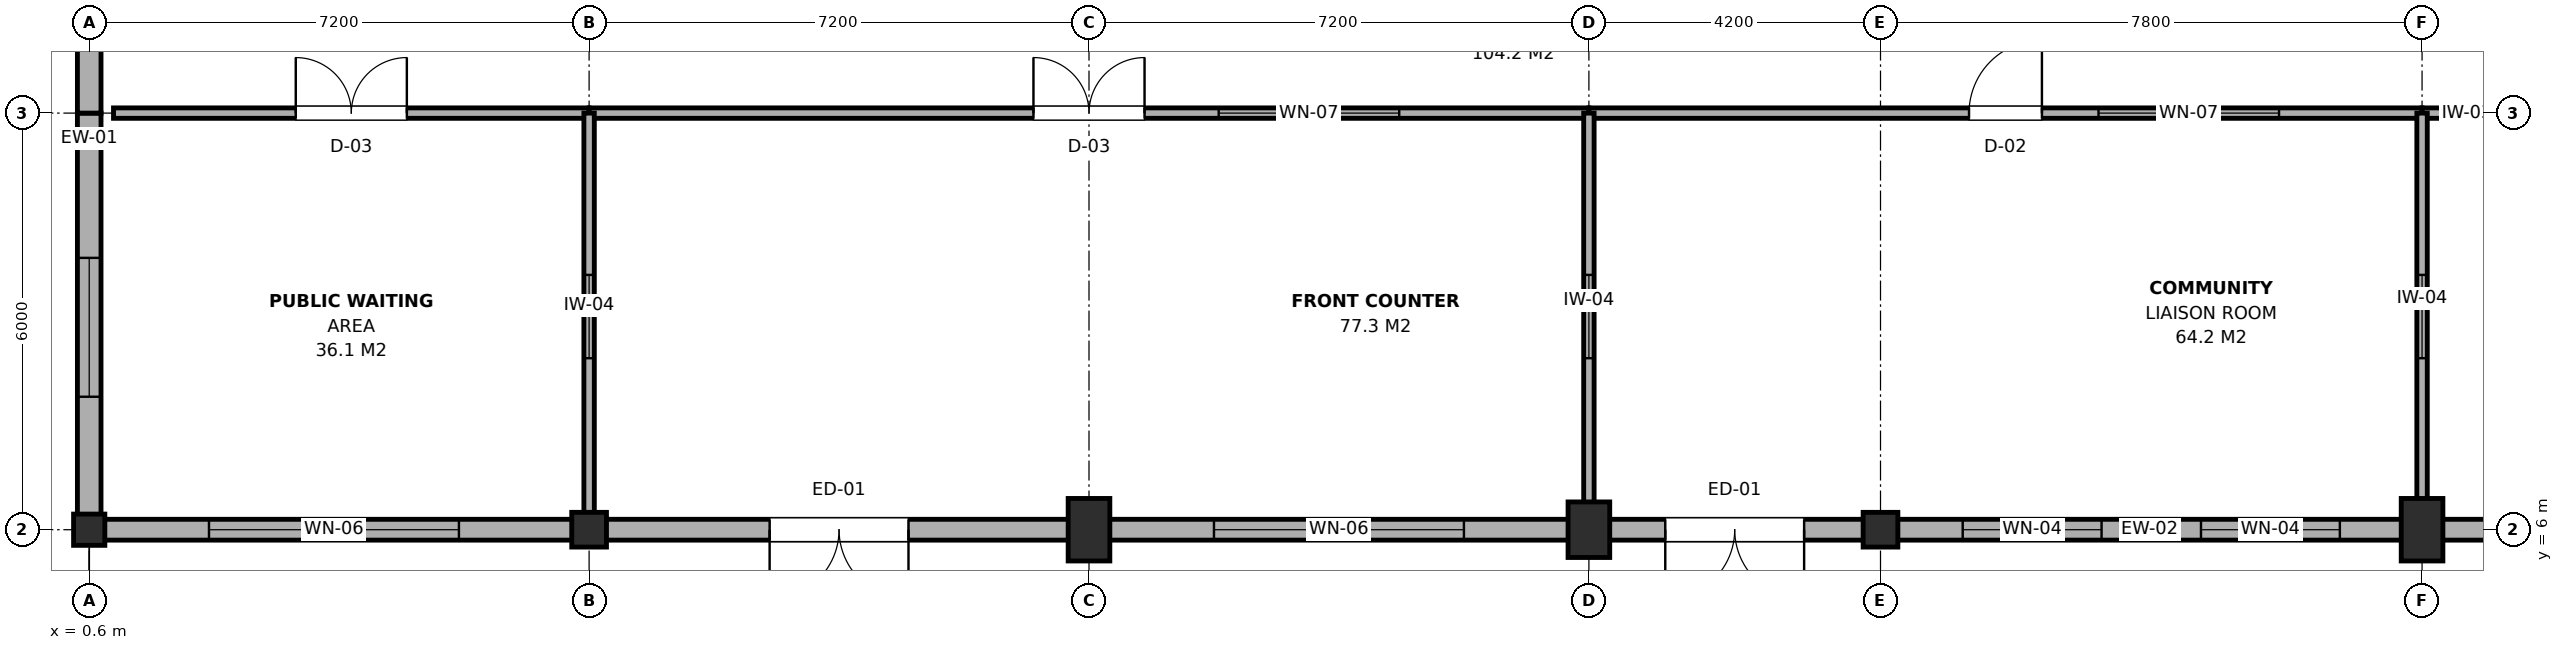
"""IFC4 building model, lengths in metres.
Left out: names, types, materials, properties, quantities, classifications, styles, units other than length and angle.
Written with IfcOpenShell. Run it as: python <this file> out.ifc"""

import sys

from ifc_helpers import new_model, si_unit, direction, frame, frame_2d, origin, origin_2d, place, context, subcontext, project, spatial, rectangle, extrude, element, fill, save


model = new_model("IFC4")
c1 = context("Model", 3, precision=1e-05, world=origin(), true_north=direction((0.0, 1.0)))
c2 = subcontext(c1, "Body", "Model", "MODEL_VIEW")
j1 = project(units=[si_unit("LENGTHUNIT", "METRE"), si_unit("PLANEANGLEUNIT", "RADIAN")], contexts=[c1])
p1 = place(None, origin())
s1 = spatial("IfcSite", under=j1, at=p1, CompositionType="ELEMENT")
p2 = place(p1, origin())
s2 = spatial("IfcBuilding", under=s1, at=p2, CompositionType="ELEMENT")
p3 = place(p2, origin())
s3 = spatial("IfcBuildingStorey", under=s2, at=p3, CompositionType="ELEMENT", Elevation=0.0)
p4 = place(p3, frame((0.6, 6.0, 0.0), z_axis=(0.0, 0.0, 1.0), x_axis=(1.0, 0.0, 0.0)))
e1 = element("IfcColumn", 1, at=p4, inside=s3, PredefinedType="COLUMN", context=c2, shape_type="SweptSolid", body=[
    extrude(rectangle(XDim=0.45, YDim=0.45, at=origin_2d()), origin(), (0.0, 0.0, 1.0), 4.8),
])
p5 = place(p3, frame((7.8, 6.0, 0.0), z_axis=(0.0, 0.0, 1.0), x_axis=(1.0, 0.0, 0.0)))
e2 = element("IfcColumn", 2, at=p5, inside=s3, PredefinedType="COLUMN", context=c2, shape_type="SweptSolid", body=[
    extrude(rectangle(XDim=0.5, YDim=0.5, at=origin_2d()), origin(), (0.0, 0.0, 1.0), 4.8),
])
p6 = place(p3, frame((15.0, 6.0, 0.0), z_axis=(0.0, 0.0, 1.0), x_axis=(1.0, 0.0, 0.0)))
e3 = element("IfcColumn", 3, at=p6, inside=s3, PredefinedType="COLUMN", context=c2, shape_type="SweptSolid", body=[
    extrude(rectangle(XDim=0.6, YDim=0.9, at=origin_2d()), origin(), (0.0, 0.0, 1.0), 4.8),
])
p7 = place(p3, frame((22.2, 6.0, 0.0), z_axis=(0.0, 0.0, 1.0), x_axis=(1.0, 0.0, 0.0)))
e4 = element("IfcColumn", 4, at=p7, inside=s3, PredefinedType="COLUMN", context=c2, shape_type="SweptSolid", body=[
    extrude(rectangle(XDim=0.6, YDim=0.8, at=origin_2d()), origin(), (0.0, 0.0, 1.0), 4.8),
])
p8 = place(p3, frame((26.4, 6.0, 0.0), z_axis=(0.0, 0.0, 1.0), x_axis=(1.0, 0.0, 0.0)))
e5 = element("IfcColumn", 5, at=p8, inside=s3, PredefinedType="COLUMN", context=c2, shape_type="SweptSolid", body=[
    extrude(rectangle(XDim=0.5, YDim=0.5, at=origin_2d()), origin(), (0.0, 0.0, 1.0), 4.8),
])
p9 = place(p3, frame((34.2, 6.0, 0.0), z_axis=(0.0, 0.0, 1.0), x_axis=(1.0, 0.0, 0.0)))
e6 = element("IfcColumn", 6, at=p9, inside=s3, PredefinedType="COLUMN", context=c2, shape_type="SweptSolid", body=[
    extrude(rectangle(XDim=0.6, YDim=0.9, at=origin_2d()), origin(), (0.0, 0.0, 1.0), 4.8),
])
p10 = place(p3, frame((0.45, 6.0, 0.0), z_axis=(0.0, 0.0, 1.0), x_axis=(1.0, 0.0, 0.0)))
e7 = element("IfcWall", 7, at=p10, inside=s3, PredefinedType="SOLIDWALL", context=c2, shape_type="SweptSolid", body=[
    extrude(rectangle(XDim=7.35, YDim=0.3, at=frame_2d((3.675, 0.0))), origin(), (0.0, 0.0, 1.0), 4.205),
])
p11 = place(p10, frame((1.875, 0.0, 0.8)))
e8 = element("IfcOpeningElement", 8, at=p11, cuts=e7, PredefinedType="OPENING", context=c2, shape_type="SweptSolid", body=[
    extrude(rectangle(XDim=3.6, YDim=2.4, at=frame_2d((1.8, 1.2))), frame((0.0, 0.165, 0.0), z_axis=(0.0, -1.0, 0.0), x_axis=(1.0, 0.0, 0.0)), (0.0, 0.0, 1.0), 0.33),
])
p12 = place(p3, frame((7.8, 6.0, 0.0), z_axis=(0.0, 0.0, 1.0), x_axis=(1.0, 0.0, 0.0)))
e9 = element("IfcWall", 9, at=p12, inside=s3, PredefinedType="SOLIDWALL", context=c2, shape_type="SweptSolid", body=[
    extrude(rectangle(XDim=7.2, YDim=0.3, at=frame_2d((3.6, 0.0))), origin(), (0.0, 0.0, 1.0), 4.205),
])
p13 = place(p12, frame((2.6, 0.0, 0.0)))
e10 = element("IfcOpeningElement", 10, at=p13, cuts=e9, PredefinedType="OPENING", context=c2, shape_type="SweptSolid", body=[
    extrude(rectangle(XDim=2.0, YDim=2.25, at=frame_2d((1.0, 1.125))), frame((0.0, 0.165, 0.0), z_axis=(0.0, -1.0, 0.0), x_axis=(1.0, 0.0, 0.0)), (0.0, 0.0, 1.0), 0.33),
])
p14 = place(p3, frame((15.0, 6.0, 0.0), z_axis=(0.0, 0.0, 1.0), x_axis=(1.0, 0.0, 0.0)))
e11 = element("IfcWall", 11, at=p14, inside=s3, PredefinedType="SOLIDWALL", context=c2, shape_type="SweptSolid", body=[
    extrude(rectangle(XDim=7.2, YDim=0.3, at=frame_2d((3.6, 0.0))), origin(), (0.0, 0.0, 1.0), 3.955),
])
p15 = place(p14, frame((1.8, 0.0, 0.8)))
e12 = element("IfcOpeningElement", 12, at=p15, cuts=e11, PredefinedType="OPENING", context=c2, shape_type="SweptSolid", body=[
    extrude(rectangle(XDim=3.6, YDim=2.4, at=frame_2d((1.8, 1.2))), frame((0.0, 0.165, 0.0), z_axis=(0.0, -1.0, 0.0), x_axis=(1.0, 0.0, 0.0)), (0.0, 0.0, 1.0), 0.33),
])
p16 = place(p3, frame((22.2, 6.0, 0.0), z_axis=(0.0, 0.0, 1.0), x_axis=(1.0, 0.0, 0.0)))
e13 = element("IfcWall", 13, at=p16, inside=s3, PredefinedType="SOLIDWALL", context=c2, shape_type="SweptSolid", body=[
    extrude(rectangle(XDim=4.2, YDim=0.3, at=frame_2d((2.1, 0.0))), origin(), (0.0, 0.0, 1.0), 4.005),
])
p17 = place(p16, frame((1.1, 0.0, 0.0)))
e14 = element("IfcOpeningElement", 14, at=p17, cuts=e13, PredefinedType="OPENING", context=c2, shape_type="SweptSolid", body=[
    extrude(rectangle(XDim=2.0, YDim=2.25, at=frame_2d((1.0, 1.125))), frame((0.0, 0.165, 0.0), z_axis=(0.0, -1.0, 0.0), x_axis=(1.0, 0.0, 0.0)), (0.0, 0.0, 1.0), 0.33),
])
p18 = place(p3, frame((26.4, 6.0, 0.0), z_axis=(0.0, 0.0, 1.0), x_axis=(1.0, 0.0, 0.0)))
e15 = element("IfcWall", 15, at=p18, inside=s3, PredefinedType="SOLIDWALL", context=c2, shape_type="SweptSolid", body=[
    extrude(rectangle(XDim=7.8, YDim=0.3, at=frame_2d((3.9, 0.0))), origin(), (0.0, 0.0, 1.0), 4.005),
])
p19 = place(p18, frame((1.184, 0.0, 0.8)))
e16 = element("IfcOpeningElement", 16, at=p19, cuts=e15, PredefinedType="OPENING", context=c2, shape_type="SweptSolid", body=[
    extrude(rectangle(XDim=2.0, YDim=1.8, at=frame_2d((1.0, 0.9))), frame((0.0, 0.165, 0.0), z_axis=(0.0, -1.0, 0.0), x_axis=(1.0, 0.0, 0.0)), (0.0, 0.0, 1.0), 0.33),
])
p20 = place(p18, frame((4.616, 0.0, 0.8)))
e17 = element("IfcOpeningElement", 17, at=p20, cuts=e15, PredefinedType="OPENING", context=c2, shape_type="SweptSolid", body=[
    extrude(rectangle(XDim=2.0, YDim=1.8, at=frame_2d((1.0, 0.9))), frame((0.0, 0.165, 0.0), z_axis=(0.0, -1.0, 0.0), x_axis=(1.0, 0.0, 0.0)), (0.0, 0.0, 1.0), 0.33),
])
p21 = place(p3, frame((34.2, 6.0, 0.0), z_axis=(0.0, 0.0, 1.0), x_axis=(1.0, 0.0, 0.0)))
e18 = element("IfcWall", 18, at=p21, inside=s3, PredefinedType="SOLIDWALL", context=c2, shape_type="SweptSolid", body=[
    extrude(rectangle(XDim=6.0, YDim=0.3, at=frame_2d((3.0, 0.0))), origin(), (0.0, 0.0, 1.0), 4.105),
])
p22 = place(p21, frame((1.2, 0.0, 0.8)))
e19 = element("IfcOpeningElement", 19, at=p22, cuts=e18, PredefinedType="OPENING", context=c2, shape_type="SweptSolid", body=[
    extrude(rectangle(XDim=3.6, YDim=2.4, at=frame_2d((1.8, 1.2))), frame((0.0, 0.165, 0.0), z_axis=(0.0, -1.0, 0.0), x_axis=(1.0, 0.0, 0.0)), (0.0, 0.0, 1.0), 0.33),
])
p23 = place(p3, frame((0.6, 5.83, 0.0), z_axis=(0.0, 0.0, 1.0), x_axis=(0.0, 1.0, 0.0)))
e20 = element("IfcWall", 20, at=p23, inside=s3, PredefinedType="SOLIDWALL", context=c2, shape_type="SweptSolid", body=[
    extrude(rectangle(XDim=6.17, YDim=0.34, at=frame_2d((3.085, 0.0))), origin(), (0.0, 0.0, 1.0), 4.055),
])
p24 = place(p23, frame((2.085, 0.0, 0.9)))
e21 = element("IfcOpeningElement", 21, at=p24, cuts=e20, PredefinedType="OPENING", context=c2, shape_type="SweptSolid", body=[
    extrude(rectangle(XDim=2.0, YDim=1.8, at=frame_2d((1.0, 0.9))), frame((0.0, 0.185, 0.0), z_axis=(0.0, -1.0, 0.0), x_axis=(1.0, 0.0, 0.0)), (0.0, 0.0, 1.0), 0.37),
])
p25 = place(p3, frame((0.6, 12.0, 0.0), z_axis=(0.0, 0.0, 1.0), x_axis=(0.0, 1.0, 0.0)))
e22 = element("IfcWall", 22, at=p25, inside=s3, PredefinedType="SOLIDWALL", context=c2, shape_type="SweptSolid", body=[
    extrude(rectangle(XDim=5.57, YDim=0.34, at=frame_2d((2.785, 0.0))), origin(), (0.0, 0.0, 1.0), 3.955),
])
p26 = place(p3, frame((0.95, 12.0, 0.0), z_axis=(0.0, 0.0, 1.0), x_axis=(1.0, 0.0, 0.0)))
e23 = element("IfcWall", 23, at=p26, inside=s3, PredefinedType="PARTITIONING", context=c2, shape_type="SweptSolid", body=[
    extrude(rectangle(XDim=6.85, YDim=0.15, at=frame_2d((3.425, 0.0))), origin(), (0.0, 0.0, 1.0), 4.055),
])
p27 = place(p26, frame((2.625, 0.0, 0.0)))
e24 = element("IfcOpeningElement", 24, at=p27, cuts=e23, PredefinedType="OPENING", context=c2, shape_type="SweptSolid", body=[
    extrude(rectangle(XDim=1.6, YDim=2.15, at=frame_2d((0.8, 1.075))), frame((0.0, 0.09, 0.0), z_axis=(0.0, -1.0, 0.0), x_axis=(1.0, 0.0, 0.0)), (0.0, 0.0, 1.0), 0.18),
])
p28 = place(p3, frame((7.8, 12.0, 0.0), z_axis=(0.0, 0.0, 1.0), x_axis=(1.0, 0.0, 0.0)))
e25 = element("IfcWall", 25, at=p28, inside=s3, PredefinedType="PARTITIONING", context=c2, shape_type="SweptSolid", body=[
    extrude(rectangle(XDim=14.4, YDim=0.15, at=frame_2d((7.2, 0.0))), origin(), (0.0, 0.0, 1.0), 4.055),
])
p29 = place(p28, frame((6.4, 0.0, 0.0)))
e26 = element("IfcOpeningElement", 26, at=p29, cuts=e25, PredefinedType="OPENING", context=c2, shape_type="SweptSolid", body=[
    extrude(rectangle(XDim=1.6, YDim=2.15, at=frame_2d((0.8, 1.075))), frame((0.0, 0.09, 0.0), z_axis=(0.0, -1.0, 0.0), x_axis=(1.0, 0.0, 0.0)), (0.0, 0.0, 1.0), 0.18),
])
p30 = place(p28, frame((9.068, 0.0, 0.95)))
e27 = element("IfcOpeningElement", 27, at=p30, cuts=e25, PredefinedType="OPENING", context=c2, shape_type="SweptSolid", body=[
    extrude(rectangle(XDim=2.6, YDim=1.5, at=frame_2d((1.3, 0.75))), frame((0.0, 0.09, 0.0), z_axis=(0.0, -1.0, 0.0), x_axis=(1.0, 0.0, 0.0)), (0.0, 0.0, 1.0), 0.18),
])
p31 = place(p3, frame((7.8, 6.14, 0.0), z_axis=(0.0, 0.0, 1.0), x_axis=(0.0, 1.0, 0.0)))
e28 = element("IfcWall", 28, at=p31, inside=s3, PredefinedType="PARTITIONING", context=c2, shape_type="SweptSolid", body=[
    extrude(rectangle(XDim=5.86, YDim=0.15, at=frame_2d((2.93, 0.0))), origin(), (0.0, 0.0, 1.0), 4.055),
])
p32 = place(p31, frame((2.33, 0.0, 0.95)))
e29 = element("IfcOpeningElement", 29, at=p32, cuts=e28, PredefinedType="OPENING", context=c2, shape_type="SweptSolid", body=[
    extrude(rectangle(XDim=1.2, YDim=1.5, at=frame_2d((0.6, 0.75))), frame((0.0, 0.09, 0.0), z_axis=(0.0, -1.0, 0.0), x_axis=(1.0, 0.0, 0.0)), (0.0, 0.0, 1.0), 0.18),
])
p33 = place(p3, frame((22.2, 12.0, 0.0), z_axis=(0.0, 0.0, 1.0), x_axis=(1.0, 0.0, 0.0)))
e30 = element("IfcWall", 30, at=p33, inside=s3, PredefinedType="PARTITIONING", context=c2, shape_type="SweptSolid", body=[
    extrude(rectangle(XDim=12.0, YDim=0.15, at=frame_2d((6.0, 0.0))), origin(), (0.0, 0.0, 1.0), 3.965),
])
p34 = place(p33, frame((5.475, 0.0, 0.0)))
e31 = element("IfcOpeningElement", 31, at=p34, cuts=e30, PredefinedType="OPENING", context=c2, shape_type="SweptSolid", body=[
    extrude(rectangle(XDim=1.05, YDim=2.15, at=frame_2d((0.525, 1.075))), frame((0.0, 0.09, 0.0), z_axis=(0.0, -1.0, 0.0), x_axis=(1.0, 0.0, 0.0)), (0.0, 0.0, 1.0), 0.18),
])
p35 = place(p33, frame((7.34, 0.0, 0.95)))
e32 = element("IfcOpeningElement", 32, at=p35, cuts=e30, PredefinedType="OPENING", context=c2, shape_type="SweptSolid", body=[
    extrude(rectangle(XDim=2.6, YDim=1.5, at=frame_2d((1.3, 0.75))), frame((0.0, 0.09, 0.0), z_axis=(0.0, -1.0, 0.0), x_axis=(1.0, 0.0, 0.0)), (0.0, 0.0, 1.0), 0.18),
])
p36 = place(p3, frame((22.2, 6.14, 0.0), z_axis=(0.0, 0.0, 1.0), x_axis=(0.0, 1.0, 0.0)))
e33 = element("IfcWall", 33, at=p36, inside=s3, PredefinedType="PARTITIONING", context=c2, shape_type="SweptSolid", body=[
    extrude(rectangle(XDim=5.86, YDim=0.15, at=frame_2d((2.93, 0.0))), origin(), (0.0, 0.0, 1.0), 4.055),
])
p37 = place(p36, frame((2.33, 0.0, 0.95)))
e34 = element("IfcOpeningElement", 34, at=p37, cuts=e33, PredefinedType="OPENING", context=c2, shape_type="SweptSolid", body=[
    extrude(rectangle(XDim=1.2, YDim=1.5, at=frame_2d((0.6, 0.75))), frame((0.0, 0.09, 0.0), z_axis=(0.0, -1.0, 0.0), x_axis=(1.0, 0.0, 0.0)), (0.0, 0.0, 1.0), 0.18),
])
p38 = place(p3, frame((34.2, 12.0, 0.0), z_axis=(0.0, 0.0, 1.0), x_axis=(1.0, 0.0, 0.0)))
e35 = element("IfcWall", 35, at=p38, inside=s3, PredefinedType="PARTITIONING", context=c2, shape_type="SweptSolid", body=[
    extrude(rectangle(XDim=15.2, YDim=0.15, at=frame_2d((7.6, 0.0))), origin(), (0.0, 0.0, 1.0), 3.865),
])
p39 = place(p38, frame((6.8, 0.0, 0.0)))
e36 = element("IfcOpeningElement", 36, at=p39, cuts=e35, PredefinedType="OPENING", context=c2, shape_type="SweptSolid", body=[
    extrude(rectangle(XDim=1.6, YDim=2.15, at=frame_2d((0.8, 1.075))), frame((0.0, 0.09, 0.0), z_axis=(0.0, -1.0, 0.0), x_axis=(1.0, 0.0, 0.0)), (0.0, 0.0, 1.0), 0.18),
])
p40 = place(p38, frame((9.644, 0.0, 0.95)))
e37 = element("IfcOpeningElement", 37, at=p40, cuts=e35, PredefinedType="OPENING", context=c2, shape_type="SweptSolid", body=[
    extrude(rectangle(XDim=2.6, YDim=1.5, at=frame_2d((1.3, 0.75))), frame((0.0, 0.09, 0.0), z_axis=(0.0, -1.0, 0.0), x_axis=(1.0, 0.0, 0.0)), (0.0, 0.0, 1.0), 0.18),
])
p41 = place(p3, frame((34.2, 6.14, 0.0), z_axis=(0.0, 0.0, 1.0), x_axis=(0.0, 1.0, 0.0)))
e38 = element("IfcWall", 38, at=p41, inside=s3, PredefinedType="PARTITIONING", context=c2, shape_type="SweptSolid", body=[
    extrude(rectangle(XDim=5.86, YDim=0.15, at=frame_2d((2.93, 0.0))), origin(), (0.0, 0.0, 1.0), 3.965),
])
p42 = place(p41, frame((2.33, 0.0, 0.95)))
e39 = element("IfcOpeningElement", 39, at=p42, cuts=e38, PredefinedType="OPENING", context=c2, shape_type="SweptSolid", body=[
    extrude(rectangle(XDim=1.2, YDim=1.5, at=frame_2d((0.6, 0.75))), frame((0.0, 0.09, 0.0), z_axis=(0.0, -1.0, 0.0), x_axis=(1.0, 0.0, 0.0)), (0.0, 0.0, 1.0), 0.18),
])
p43 = place(p11, origin())
e40 = element("IfcWindow", 40, at=p43, inside=s3, PartitioningType="SINGLE_PANEL", PredefinedType="WINDOW", context=c2, shape_type="SweptSolid", body=[
    extrude(rectangle(XDim=3.6, YDim=2.4, at=frame_2d((1.8, 1.2))), frame((0.0, 0.03, 0.0), z_axis=(0.0, -1.0, 0.0), x_axis=(1.0, 0.0, 0.0)), (0.0, 0.0, 1.0), 0.06),
])
fill(e8, e40)
p44 = place(p13, frame((2.0, 0.0, 0.0), z_axis=(0.0, 0.0, 1.0), x_axis=(-1.0, 0.0, 0.0)))
e41 = element("IfcDoor", 41, at=p44, inside=s3, OperationType="DOUBLE_DOOR_SINGLE_SWING", PredefinedType="DOOR", context=c2, shape_type="SweptSolid", body=[
    extrude(rectangle(XDim=2.0, YDim=2.25, at=frame_2d((1.0, 1.125))), frame((0.0, 0.025, 0.0), z_axis=(0.0, -1.0, 0.0), x_axis=(1.0, 0.0, 0.0)), (0.0, 0.0, 1.0), 0.05),
])
fill(e10, e41)
p45 = place(p15, origin())
e42 = element("IfcWindow", 42, at=p45, inside=s3, PartitioningType="SINGLE_PANEL", PredefinedType="WINDOW", context=c2, shape_type="SweptSolid", body=[
    extrude(rectangle(XDim=3.6, YDim=2.4, at=frame_2d((1.8, 1.2))), frame((0.0, 0.03, 0.0), z_axis=(0.0, -1.0, 0.0), x_axis=(1.0, 0.0, 0.0)), (0.0, 0.0, 1.0), 0.06),
])
fill(e12, e42)
p46 = place(p17, frame((2.0, 0.0, 0.0), z_axis=(0.0, 0.0, 1.0), x_axis=(-1.0, 0.0, 0.0)))
e43 = element("IfcDoor", 43, at=p46, inside=s3, OperationType="DOUBLE_DOOR_SINGLE_SWING", PredefinedType="DOOR", context=c2, shape_type="SweptSolid", body=[
    extrude(rectangle(XDim=2.0, YDim=2.25, at=frame_2d((1.0, 1.125))), frame((0.0, 0.025, 0.0), z_axis=(0.0, -1.0, 0.0), x_axis=(1.0, 0.0, 0.0)), (0.0, 0.0, 1.0), 0.05),
])
fill(e14, e43)
p47 = place(p19, origin())
e44 = element("IfcWindow", 44, at=p47, inside=s3, PartitioningType="SINGLE_PANEL", PredefinedType="WINDOW", context=c2, shape_type="SweptSolid", body=[
    extrude(rectangle(XDim=2.0, YDim=1.8, at=frame_2d((1.0, 0.9))), frame((0.0, 0.03, 0.0), z_axis=(0.0, -1.0, 0.0), x_axis=(1.0, 0.0, 0.0)), (0.0, 0.0, 1.0), 0.06),
])
fill(e16, e44)
p48 = place(p20, origin())
e45 = element("IfcWindow", 45, at=p48, inside=s3, PartitioningType="SINGLE_PANEL", PredefinedType="WINDOW", context=c2, shape_type="SweptSolid", body=[
    extrude(rectangle(XDim=2.0, YDim=1.8, at=frame_2d((1.0, 0.9))), frame((0.0, 0.03, 0.0), z_axis=(0.0, -1.0, 0.0), x_axis=(1.0, 0.0, 0.0)), (0.0, 0.0, 1.0), 0.06),
])
fill(e17, e45)
p49 = place(p24, origin())
e46 = element("IfcWindow", 46, at=p49, inside=s3, PartitioningType="SINGLE_PANEL", PredefinedType="WINDOW", context=c2, shape_type="SweptSolid", body=[
    extrude(rectangle(XDim=2.0, YDim=1.8, at=frame_2d((1.0, 0.9))), frame((0.0, 0.03, 0.0), z_axis=(0.0, -1.0, 0.0), x_axis=(1.0, 0.0, 0.0)), (0.0, 0.0, 1.0), 0.06),
])
fill(e21, e46)
p50 = place(p27, origin())
e47 = element("IfcDoor", 47, at=p50, inside=s3, OperationType="DOUBLE_DOOR_SINGLE_SWING", PredefinedType="DOOR", context=c2, shape_type="SweptSolid", body=[
    extrude(rectangle(XDim=1.6, YDim=2.15, at=frame_2d((0.8, 1.075))), frame((0.0, 0.025, 0.0), z_axis=(0.0, -1.0, 0.0), x_axis=(1.0, 0.0, 0.0)), (0.0, 0.0, 1.0), 0.05),
])
fill(e24, e47)
p51 = place(p29, origin())
e48 = element("IfcDoor", 48, at=p51, inside=s3, OperationType="DOUBLE_DOOR_SINGLE_SWING", PredefinedType="DOOR", context=c2, shape_type="SweptSolid", body=[
    extrude(rectangle(XDim=1.6, YDim=2.15, at=frame_2d((0.8, 1.075))), frame((0.0, 0.025, 0.0), z_axis=(0.0, -1.0, 0.0), x_axis=(1.0, 0.0, 0.0)), (0.0, 0.0, 1.0), 0.05),
])
fill(e26, e48)
p52 = place(p30, origin())
e49 = element("IfcWindow", 49, at=p52, inside=s3, PartitioningType="SINGLE_PANEL", PredefinedType="WINDOW", context=c2, shape_type="SweptSolid", body=[
    extrude(rectangle(XDim=2.6, YDim=1.5, at=frame_2d((1.3, 0.75))), frame((0.0, 0.03, 0.0), z_axis=(0.0, -1.0, 0.0), x_axis=(1.0, 0.0, 0.0)), (0.0, 0.0, 1.0), 0.06),
])
fill(e27, e49)
p53 = place(p32, origin())
e50 = element("IfcWindow", 50, at=p53, inside=s3, PartitioningType="SINGLE_PANEL", PredefinedType="WINDOW", context=c2, shape_type="SweptSolid", body=[
    extrude(rectangle(XDim=1.2, YDim=1.5, at=frame_2d((0.6, 0.75))), frame((0.0, 0.03, 0.0), z_axis=(0.0, -1.0, 0.0), x_axis=(1.0, 0.0, 0.0)), (0.0, 0.0, 1.0), 0.06),
])
fill(e29, e50)
p54 = place(p34, origin())
e51 = element("IfcDoor", 51, at=p54, inside=s3, OperationType="SINGLE_SWING_RIGHT", PredefinedType="DOOR", context=c2, shape_type="SweptSolid", body=[
    extrude(rectangle(XDim=1.05, YDim=2.15, at=frame_2d((0.525, 1.075))), frame((0.0, 0.025, 0.0), z_axis=(0.0, -1.0, 0.0), x_axis=(1.0, 0.0, 0.0)), (0.0, 0.0, 1.0), 0.05),
])
fill(e31, e51)
p55 = place(p35, origin())
e52 = element("IfcWindow", 52, at=p55, inside=s3, PartitioningType="SINGLE_PANEL", PredefinedType="WINDOW", context=c2, shape_type="SweptSolid", body=[
    extrude(rectangle(XDim=2.6, YDim=1.5, at=frame_2d((1.3, 0.75))), frame((0.0, 0.03, 0.0), z_axis=(0.0, -1.0, 0.0), x_axis=(1.0, 0.0, 0.0)), (0.0, 0.0, 1.0), 0.06),
])
fill(e32, e52)
p56 = place(p37, origin())
e53 = element("IfcWindow", 53, at=p56, inside=s3, PartitioningType="SINGLE_PANEL", PredefinedType="WINDOW", context=c2, shape_type="SweptSolid", body=[
    extrude(rectangle(XDim=1.2, YDim=1.5, at=frame_2d((0.6, 0.75))), frame((0.0, 0.03, 0.0), z_axis=(0.0, -1.0, 0.0), x_axis=(1.0, 0.0, 0.0)), (0.0, 0.0, 1.0), 0.06),
])
fill(e34, e53)
p57 = place(p42, origin())
e54 = element("IfcWindow", 54, at=p57, inside=s3, PartitioningType="SINGLE_PANEL", PredefinedType="WINDOW", context=c2, shape_type="SweptSolid", body=[
    extrude(rectangle(XDim=1.2, YDim=1.5, at=frame_2d((0.6, 0.75))), frame((0.0, 0.03, 0.0), z_axis=(0.0, -1.0, 0.0), x_axis=(1.0, 0.0, 0.0)), (0.0, 0.0, 1.0), 0.06),
])
fill(e39, e54)
save(model, sys.argv[1])
